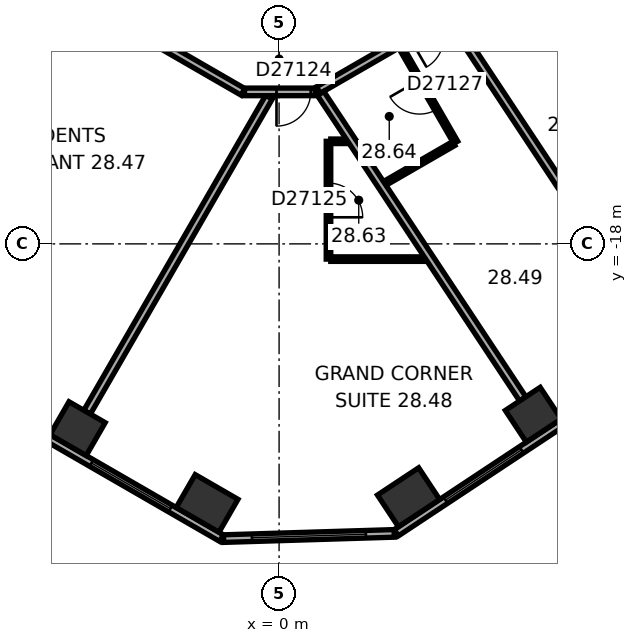
"""IFC4 building model, lengths in metres.
Left out: names, types, materials, properties, quantities, classifications, styles, units other than length and angle.
Written with IfcOpenShell. Run it as: python <this file> out.ifc"""

import sys

from ifc_helpers import new_model, si_unit, direction, frame, frame_2d, origin, origin_2d, place, context, subcontext, project, spatial, rectangle, extrude, element, fill, save


model = new_model("IFC4")
c1 = context("Model", 3, precision=1e-05, world=origin(), true_north=direction((0.0, 1.0)))
c2 = subcontext(c1, "Body", "Model", "MODEL_VIEW")
j1 = project(units=[si_unit("LENGTHUNIT", "METRE"), si_unit("PLANEANGLEUNIT", "RADIAN")], contexts=[c1])
p1 = place(None, origin())
s1 = spatial("IfcSite", under=j1, at=p1, CompositionType="ELEMENT")
p2 = place(p1, origin())
s2 = spatial("IfcBuilding", under=s1, at=p2, CompositionType="ELEMENT")
p3 = place(p2, frame((0.0, 0.0, 116.6)))
s3 = spatial("IfcBuildingStorey", under=s2, at=p3, CompositionType="ELEMENT", Elevation=116.6)
p4 = place(p3, frame((-5.302, -22.862, 0.0), z_axis=(0.0, 0.0, 1.0), x_axis=(0.866025403784, -0.5, 0.0)))
e1 = element("IfcColumn", 1, at=p4, inside=s3, PredefinedType="COLUMN", context=c2, shape_type="SweptSolid", body=[
    extrude(rectangle(XDim=1.1, YDim=1.0, at=origin_2d()), origin(), (0.0, 0.0, 1.0), 3.3),
])
for number, where, z_axis, x_axis in (
    (2, (-1.895, -24.829, 0.0), (0.0, 0.0, 1.0), (0.866, -0.5, 0.0)),
    (3, (3.407, -24.667, 0.0), (0.0, 0.0, 1.0), (0.834, 0.552, 0.0)),
):
    element("IfcColumn", number, at=place(p3, frame(where, z_axis=z_axis, x_axis=x_axis)), inside=s3, PredefinedType="COLUMN", context=c2, shape_type="SweptSolid", body=[
        extrude(rectangle(XDim=1.3, YDim=1.0, at=origin_2d()), origin(), (0.0, 0.0, 1.0), 3.3),
    ])
p5 = place(p3, frame((6.688, -22.496, 0.0), z_axis=(0.0, 0.0, 1.0), x_axis=(0.833885822067, 0.551936985312, 0.0)))
e4 = element("IfcColumn", 4, at=p5, inside=s3, PredefinedType="COLUMN", context=c2, shape_type="SweptSolid", body=[
    extrude(rectangle(XDim=1.1, YDim=1.0, at=origin_2d()), origin(), (0.0, 0.0, 1.0), 3.3),
])
p6 = place(p3, frame((-19.914, -15.119, 0.0), z_axis=(0.0, 0.0, 1.0), x_axis=(0.866025418898, -0.499999973822, 0.0)))
e5 = element("IfcWall", 5, at=p6, inside=s3, PredefinedType="STANDARD", context=c2, shape_type="SweptSolid", body=[
    extrude(rectangle(XDim=21.246, YDim=0.2, at=frame_2d((10.623, 0.0))), origin(), (0.0, 0.0, 1.0), 3.3),
])
p7 = place(p6, frame((1.555, 0.0, 0.8)))
e6 = element("IfcOpeningElement", 6, at=p7, cuts=e5, PredefinedType="OPENING", context=c2, shape_type="SweptSolid", body=[
    extrude(rectangle(XDim=2.4, YDim=1.7, at=frame_2d((1.2, 0.85))), frame((0.0, 0.11, 0.0), z_axis=(0.0, -1.0, 0.0), x_axis=(1.0, 0.0, 0.0)), (0.0, 0.0, 1.0), 0.22),
])
p8 = place(p6, frame((5.489, 0.0, 0.8)))
e7 = element("IfcOpeningElement", 7, at=p8, cuts=e5, PredefinedType="OPENING", context=c2, shape_type="SweptSolid", body=[
    extrude(rectangle(XDim=2.4, YDim=1.7, at=frame_2d((1.2, 0.85))), frame((0.0, 0.11, 0.0), z_axis=(0.0, -1.0, 0.0), x_axis=(1.0, 0.0, 0.0)), (0.0, 0.0, 1.0), 0.22),
])
p9 = place(p6, frame((9.424, 0.0, 0.8)))
e8 = element("IfcOpeningElement", 8, at=p9, cuts=e5, PredefinedType="OPENING", context=c2, shape_type="SweptSolid", body=[
    extrude(rectangle(XDim=2.4, YDim=1.7, at=frame_2d((1.2, 0.85))), frame((0.0, 0.11, 0.0), z_axis=(0.0, -1.0, 0.0), x_axis=(1.0, 0.0, 0.0)), (0.0, 0.0, 1.0), 0.22),
])
p10 = place(p6, frame((13.358, 0.0, 0.8)))
e9 = element("IfcOpeningElement", 9, at=p10, cuts=e5, PredefinedType="OPENING", context=c2, shape_type="SweptSolid", body=[
    extrude(rectangle(XDim=2.4, YDim=1.7, at=frame_2d((1.2, 0.85))), frame((0.0, 0.11, 0.0), z_axis=(0.0, -1.0, 0.0), x_axis=(1.0, 0.0, 0.0)), (0.0, 0.0, 1.0), 0.22),
])
p11 = place(p6, frame((17.293, 0.0, 0.8)))
e10 = element("IfcOpeningElement", 10, at=p11, cuts=e5, PredefinedType="OPENING", context=c2, shape_type="SweptSolid", body=[
    extrude(rectangle(XDim=2.4, YDim=1.7, at=frame_2d((1.2, 0.85))), frame((0.0, 0.11, 0.0), z_axis=(0.0, -1.0, 0.0), x_axis=(1.0, 0.0, 0.0)), (0.0, 0.0, 1.0), 0.22),
])
p12 = place(p3, frame((-1.461, -25.755, 0.0), z_axis=(0.0, 0.0, 1.0), x_axis=(0.999533823446, 0.030530898895, 0.0)))
e11 = element("IfcWall", 11, at=p12, inside=s3, PredefinedType="STANDARD", context=c2, shape_type="SweptSolid", body=[
    extrude(rectangle(XDim=4.494, YDim=0.2, at=frame_2d((2.247, 0.0))), origin(), (0.0, 0.0, 1.0), 3.3),
])
p13 = place(p12, frame((0.747, 0.0, 0.8)))
e12 = element("IfcOpeningElement", 12, at=p13, cuts=e11, PredefinedType="OPENING", context=c2, shape_type="SweptSolid", body=[
    extrude(rectangle(XDim=3.0, YDim=1.7, at=frame_2d((1.5, 0.85))), frame((0.0, 0.11, 0.0), z_axis=(0.0, -1.0, 0.0), x_axis=(1.0, 0.0, 0.0)), (0.0, 0.0, 1.0), 0.22),
])
p14 = place(p3, frame((3.083, -25.601, 0.0), z_axis=(0.0, 0.0, 1.0), x_axis=(0.833884295743, 0.551939291329, 0.0)))
e13 = element("IfcWall", 13, at=p14, inside=s3, PredefinedType="STANDARD", context=c2, shape_type="SweptSolid", body=[
    extrude(rectangle(XDim=21.246, YDim=0.2, at=frame_2d((10.623, 0.0))), origin(), (0.0, 0.0, 1.0), 3.3),
])
p15 = place(p14, frame((1.553, 0.0, 0.8)))
e14 = element("IfcOpeningElement", 14, at=p15, cuts=e13, PredefinedType="OPENING", context=c2, shape_type="SweptSolid", body=[
    extrude(rectangle(XDim=2.4, YDim=1.7, at=frame_2d((1.2, 0.85))), frame((0.0, 0.11, 0.0), z_axis=(0.0, -1.0, 0.0), x_axis=(1.0, 0.0, 0.0)), (0.0, 0.0, 1.0), 0.22),
])
p16 = place(p14, frame((5.488, 0.0, 0.8)))
e15 = element("IfcOpeningElement", 15, at=p16, cuts=e13, PredefinedType="OPENING", context=c2, shape_type="SweptSolid", body=[
    extrude(rectangle(XDim=2.4, YDim=1.7, at=frame_2d((1.2, 0.85))), frame((0.0, 0.11, 0.0), z_axis=(0.0, -1.0, 0.0), x_axis=(1.0, 0.0, 0.0)), (0.0, 0.0, 1.0), 0.22),
])
p17 = place(p14, frame((9.422, 0.0, 0.8)))
e16 = element("IfcOpeningElement", 16, at=p17, cuts=e13, PredefinedType="OPENING", context=c2, shape_type="SweptSolid", body=[
    extrude(rectangle(XDim=2.4, YDim=1.7, at=frame_2d((1.2, 0.85))), frame((0.0, 0.11, 0.0), z_axis=(0.0, -1.0, 0.0), x_axis=(1.0, 0.0, 0.0)), (0.0, 0.0, 1.0), 0.22),
])
p18 = place(p14, frame((13.357, 0.0, 0.8)))
e17 = element("IfcOpeningElement", 17, at=p18, cuts=e13, PredefinedType="OPENING", context=c2, shape_type="SweptSolid", body=[
    extrude(rectangle(XDim=2.4, YDim=1.7, at=frame_2d((1.2, 0.85))), frame((0.0, 0.11, 0.0), z_axis=(0.0, -1.0, 0.0), x_axis=(1.0, 0.0, 0.0)), (0.0, 0.0, 1.0), 0.22),
])
p19 = place(p14, frame((17.291, 0.0, 0.8)))
e18 = element("IfcOpeningElement", 18, at=p19, cuts=e13, PredefinedType="OPENING", context=c2, shape_type="SweptSolid", body=[
    extrude(rectangle(XDim=2.4, YDim=1.7, at=frame_2d((1.2, 0.85))), frame((0.0, 0.11, 0.0), z_axis=(0.0, -1.0, 0.0), x_axis=(1.0, 0.0, 0.0)), (0.0, 0.0, 1.0), 0.22),
])
p20 = place(p3, frame((-11.615, -7.843, 0.0), z_axis=(0.0, 0.0, 1.0), x_axis=(0.866026466995, -0.499998158461, 0.0)))
e19 = element("IfcWall", 19, at=p20, inside=s3, PredefinedType="PARTITIONING", context=c2, shape_type="SweptSolid", body=[
    extrude(rectangle(XDim=12.315, YDim=0.2, at=frame_2d((6.158, 0.0))), origin(), (0.0, 0.0, 1.0), 2.95),
])
p21 = place(p20, frame((6.244, 0.0, 0.0)))
e20 = element("IfcOpeningElement", 20, at=p21, cuts=e19, PredefinedType="OPENING", context=c2, shape_type="SweptSolid", body=[
    extrude(rectangle(XDim=1.0, YDim=2.1, at=frame_2d((0.5, 1.05))), frame((0.0, 0.11, 0.0), z_axis=(0.0, -1.0, 0.0), x_axis=(1.0, 0.0, 0.0)), (0.0, 0.0, 1.0), 0.22),
])
p22 = place(p3, frame((-5.052, -22.429, 0.0), z_axis=(0.0, 0.0, 1.0), x_axis=(0.500004329283, 0.866022904257, 0.0)))
e21 = element("IfcWall", 21, at=p22, inside=s3, PredefinedType="PARTITIONING", context=c2, shape_type="SweptSolid", body=[
    extrude(rectangle(XDim=9.572, YDim=0.2, at=frame_2d((4.786, 0.0))), origin(), (0.0, 0.0, 1.0), 2.95),
])
p23 = place(p3, frame((-0.91, -14.001, 0.0), z_axis=(0.0, 0.0, 1.0), x_axis=(1.0, 0.0, 0.0)))
e22 = element("IfcWall", 22, at=p23, inside=s3, PredefinedType="PARTITIONING", context=c2, shape_type="SweptSolid", body=[
    extrude(rectangle(XDim=1.86, YDim=0.2, at=frame_2d((0.93, 0.0))), origin(), (0.0, 0.0, 1.0), 2.95),
])
p24 = place(p23, frame((0.842, 0.0, 0.0)))
e23 = element("IfcOpeningElement", 23, at=p24, cuts=e22, PredefinedType="OPENING", context=c2, shape_type="SweptSolid", body=[
    extrude(rectangle(XDim=0.9, YDim=2.1, at=frame_2d((0.45, 1.05))), frame((0.0, 0.11, 0.0), z_axis=(0.0, -1.0, 0.0), x_axis=(1.0, 0.0, 0.0)), (0.0, 0.0, 1.0), 0.22),
])
p25 = place(p3, frame((1.033, -13.953, 0.0), z_axis=(0.0, 0.0, 1.0), x_axis=(0.866017531406, 0.500013635111, 0.0)))
e24 = element("IfcWall", 24, at=p25, inside=s3, PredefinedType="PARTITIONING", context=c2, shape_type="SweptSolid", body=[
    extrude(rectangle(XDim=6.58, YDim=0.2, at=frame_2d((3.29, 0.0))), origin(), (0.0, 0.0, 1.0), 2.95),
])
p26 = place(p25, frame((2.767, 0.0, 0.0)))
e25 = element("IfcOpeningElement", 25, at=p26, cuts=e24, PredefinedType="OPENING", context=c2, shape_type="SweptSolid", body=[
    extrude(rectangle(XDim=0.9, YDim=2.1, at=frame_2d((0.45, 1.05))), frame((0.0, 0.11, 0.0), z_axis=(0.0, -1.0, 0.0), x_axis=(1.0, 0.0, 0.0)), (0.0, 0.0, 1.0), 0.22),
])
p27 = place(p25, frame((4.811, 0.0, 0.0)))
e26 = element("IfcOpeningElement", 26, at=p27, cuts=e24, PredefinedType="OPENING", context=c2, shape_type="SweptSolid", body=[
    extrude(rectangle(XDim=0.9, YDim=2.1, at=frame_2d((0.45, 1.05))), frame((0.0, 0.11, 0.0), z_axis=(0.0, -1.0, 0.0), x_axis=(1.0, 0.0, 0.0)), (0.0, 0.0, 1.0), 0.22),
])
p28 = place(p3, frame((1.3, -18.401, 0.0), z_axis=(0.0, 0.0, 1.0), x_axis=(0.0, 1.0, 0.0)))
e27 = element("IfcWall", 27, at=p28, inside=s3, PredefinedType="PARTITIONING", context=c2, shape_type="SweptSolid", body=[
    extrude(rectangle(XDim=3.1, YDim=0.12, at=frame_2d((1.55, 0.0))), origin(), (0.0, 0.0, 1.0), 2.95),
])
p29 = place(p28, frame((1.1, 0.0, 0.0)))
e28 = element("IfcOpeningElement", 28, at=p29, cuts=e27, PredefinedType="OPENING", context=c2, shape_type="SweptSolid", body=[
    extrude(rectangle(XDim=0.9, YDim=2.1, at=frame_2d((0.45, 1.05))), frame((0.0, 0.07, 0.0), z_axis=(0.0, -1.0, 0.0), x_axis=(1.0, 0.0, 0.0)), (0.0, 0.0, 1.0), 0.14),
])
p30 = place(p3, frame((1.36, -15.301, 0.0), z_axis=(0.0, 0.0, 1.0), x_axis=(1.0, 0.0, 0.0)))
e29 = element("IfcWall", 29, at=p30, inside=s3, PredefinedType="PARTITIONING", context=c2, shape_type="SweptSolid", body=[
    extrude(rectangle(XDim=0.416, YDim=0.12, at=frame_2d((0.208, 0.0))), origin(), (0.0, 0.0, 1.0), 2.95),
])
p31 = place(p3, frame((3.198, -12.818, 0.0), z_axis=(0.0, 0.0, 1.0), x_axis=(0.499987231761, -0.866032775405, 0.0)))
e30 = element("IfcWall", 30, at=p31, inside=s3, PredefinedType="PARTITIONING", context=c2, shape_type="SweptSolid", body=[
    extrude(rectangle(XDim=2.9, YDim=0.12, at=frame_2d((1.45, 0.0))), origin(), (0.0, 0.0, 1.0), 2.95),
])
p32 = place(p31, frame((1.0, 0.0, 0.0)))
e31 = element("IfcOpeningElement", 31, at=p32, cuts=e30, PredefinedType="OPENING", context=c2, shape_type="SweptSolid", body=[
    extrude(rectangle(XDim=0.9, YDim=2.1, at=frame_2d((0.45, 1.05))), frame((0.0, 0.07, 0.0), z_axis=(0.0, -1.0, 0.0), x_axis=(1.0, 0.0, 0.0)), (0.0, 0.0, 1.0), 0.14),
])
p33 = place(p3, frame((3.828, -18.401, 0.0), z_axis=(0.0, 0.0, 1.0), x_axis=(-1.0, 0.0, 0.0)))
e32 = element("IfcWall", 32, at=p33, inside=s3, PredefinedType="PARTITIONING", context=c2, shape_type="SweptSolid", body=[
    extrude(rectangle(XDim=2.468, YDim=0.12, at=frame_2d((1.234, 0.0))), origin(), (0.0, 0.0, 1.0), 2.95),
])
p34 = place(p3, frame((4.596, -15.36, 0.0), z_axis=(0.0, 0.0, 1.0), x_axis=(-0.865986006152, -0.500068232493, 0.0)))
e33 = element("IfcWall", 33, at=p34, inside=s3, PredefinedType="PARTITIONING", context=c2, shape_type="SweptSolid", body=[
    extrude(rectangle(XDim=2.098, YDim=0.12, at=frame_2d((1.049, 0.0))), origin(), (0.0, 0.0, 1.0), 2.95),
])
p35 = place(p3, frame((6.412, -22.079, 0.0), z_axis=(0.0, 0.0, 1.0), x_axis=(-0.551919507115, 0.83389739037, 0.0)))
e34 = element("IfcWall", 34, at=p35, inside=s3, PredefinedType="PARTITIONING", context=c2, shape_type="SweptSolid", body=[
    extrude(rectangle(XDim=9.635, YDim=0.2, at=frame_2d((4.817, 0.0))), origin(), (0.0, 0.0, 1.0), 2.95),
])
p36 = place(p3, frame((9.693, -19.907, 0.0), z_axis=(0.0, 0.0, 1.0), x_axis=(-0.551938394837, 0.833884889121, 0.0)))
e35 = element("IfcWall", 35, at=p36, inside=s3, PredefinedType="PARTITIONING", context=c2, shape_type="SweptSolid", body=[
    extrude(rectangle(XDim=9.394, YDim=0.2, at=frame_2d((4.697, 0.0))), origin(), (0.0, 0.0, 1.0), 2.15),
])
p37 = place(p11, origin())
e36 = element("IfcWindow", 36, at=p37, inside=s3, PartitioningType="SINGLE_PANEL", PredefinedType="WINDOW", context=c2, shape_type="SweptSolid", body=[
    extrude(rectangle(XDim=2.4, YDim=1.7, at=frame_2d((1.2, 0.85))), frame((0.0, 0.03, 0.0), z_axis=(0.0, -1.0, 0.0), x_axis=(1.0, 0.0, 0.0)), (0.0, 0.0, 1.0), 0.06),
])
fill(e10, e36)
p38 = place(p13, origin())
e37 = element("IfcWindow", 37, at=p38, inside=s3, PartitioningType="SINGLE_PANEL", PredefinedType="WINDOW", context=c2, shape_type="SweptSolid", body=[
    extrude(rectangle(XDim=3.0, YDim=1.7, at=frame_2d((1.5, 0.85))), frame((0.0, 0.03, 0.0), z_axis=(0.0, -1.0, 0.0), x_axis=(1.0, 0.0, 0.0)), (0.0, 0.0, 1.0), 0.06),
])
fill(e12, e37)
p39 = place(p15, origin())
e38 = element("IfcWindow", 38, at=p39, inside=s3, PartitioningType="SINGLE_PANEL", PredefinedType="WINDOW", context=c2, shape_type="SweptSolid", body=[
    extrude(rectangle(XDim=2.4, YDim=1.7, at=frame_2d((1.2, 0.85))), frame((0.0, 0.03, 0.0), z_axis=(0.0, -1.0, 0.0), x_axis=(1.0, 0.0, 0.0)), (0.0, 0.0, 1.0), 0.06),
])
fill(e14, e38)
p40 = place(p24, origin())
e39 = element("IfcDoor", 39, at=p40, inside=s3, OperationType="SINGLE_SWING_LEFT", PredefinedType="DOOR", context=c2, shape_type="SweptSolid", body=[
    extrude(rectangle(XDim=0.9, YDim=2.1, at=frame_2d((0.45, 1.05))), frame((0.0, 0.025, 0.0), z_axis=(0.0, -1.0, 0.0), x_axis=(1.0, 0.0, 0.0)), (0.0, 0.0, 1.0), 0.05),
])
fill(e23, e39)
p41 = place(p29, origin())
e40 = element("IfcDoor", 40, at=p41, inside=s3, OperationType="SINGLE_SWING_LEFT", PredefinedType="DOOR", context=c2, shape_type="SweptSolid", body=[
    extrude(rectangle(XDim=0.9, YDim=2.1, at=frame_2d((0.45, 1.05))), frame((0.0, 0.025, 0.0), z_axis=(0.0, -1.0, 0.0), x_axis=(1.0, 0.0, 0.0)), (0.0, 0.0, 1.0), 0.05),
])
fill(e28, e40)
p42 = place(p32, origin())
e41 = element("IfcDoor", 41, at=p42, inside=s3, OperationType="SINGLE_SWING_LEFT", PredefinedType="DOOR", context=c2, shape_type="SweptSolid", body=[
    extrude(rectangle(XDim=0.9, YDim=2.1, at=frame_2d((0.45, 1.05))), frame((0.0, 0.025, 0.0), z_axis=(0.0, -1.0, 0.0), x_axis=(1.0, 0.0, 0.0)), (0.0, 0.0, 1.0), 0.05),
])
fill(e31, e41)
save(model, sys.argv[1])
